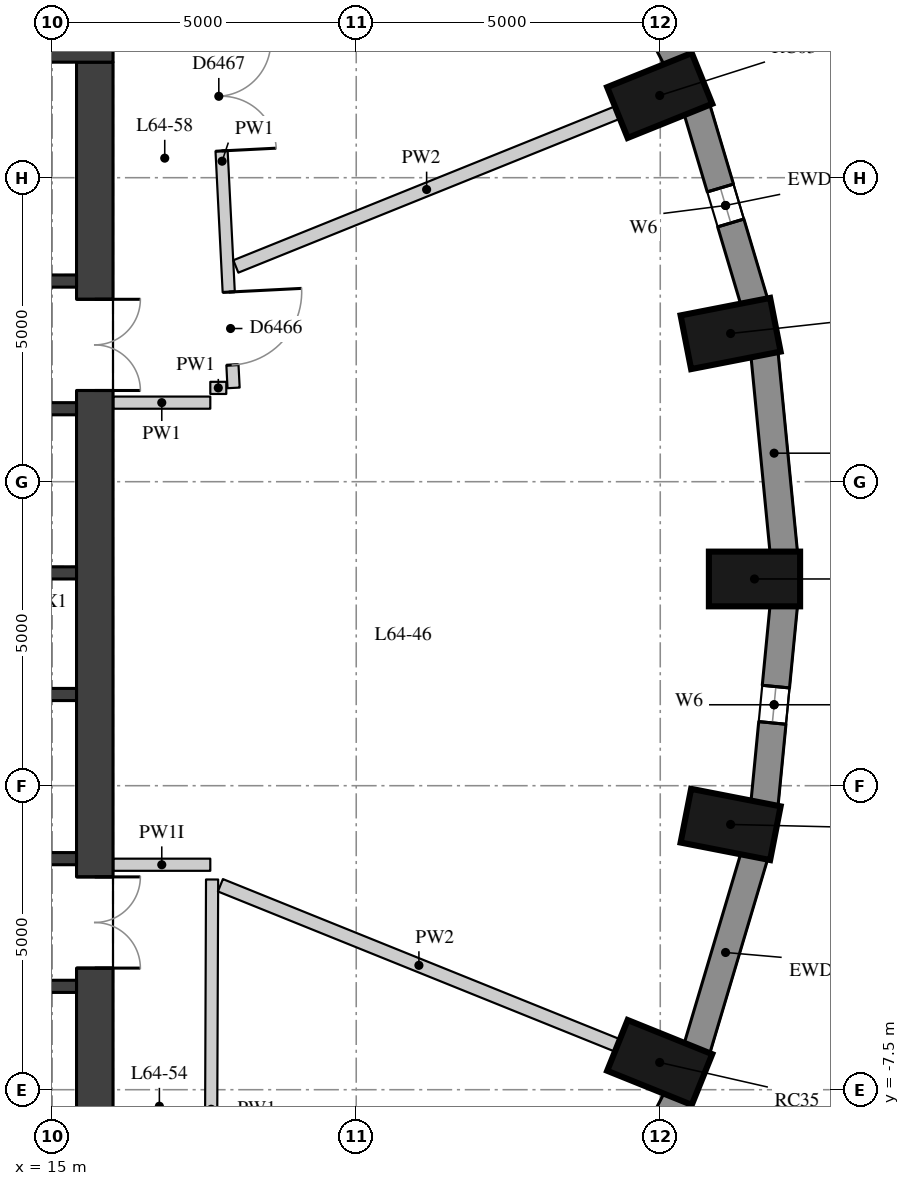
"""IFC4 building model, lengths in metres.
Left out: names, types, materials, properties, quantities, classifications, styles, units other than length and angle.
Written with IfcOpenShell. Run it as: python <this file> out.ifc"""

import sys

from ifc_helpers import new_model, si_unit, direction, frame, frame_2d, origin, origin_2d, place, context, subcontext, project, spatial, rectangle, extrude, element, fill, save


model = new_model("IFC4")
c1 = context("Model", 3, precision=1e-05, world=origin(), true_north=direction((0.0, 1.0)))
c2 = subcontext(c1, "Body", "Model", "MODEL_VIEW")
j1 = project(units=[si_unit("LENGTHUNIT", "METRE"), si_unit("PLANEANGLEUNIT", "RADIAN")], contexts=[c1])
p1 = place(None, origin())
s1 = spatial("IfcSite", under=j1, at=p1, CompositionType="ELEMENT")
p2 = place(p1, origin())
s2 = spatial("IfcBuilding", under=s1, at=p2, CompositionType="ELEMENT")
p3 = place(p2, frame((0.0, 0.0, 225.5)))
s3 = spatial("IfcBuildingStorey", under=s2, at=p3, CompositionType="ELEMENT", Elevation=225.5)
for number, where, z_axis, x_axis in (
    (1, (26.55, 0.9, 0.0), (0.0, 0.0, 1.0), (1.0, 0.0, 0.0)),
    (2, (26.157, 4.937, 0.0), (0.0, 0.0, 1.0), (0.981, 0.192, 0.0)),
    (3, (24.991, 8.852, 0.0), (0.0, 0.0, 1.0), (0.927, 0.374, 0.0)),
    (4, (24.991, -7.052, 0.0), (0.0, 0.0, 1.0), (0.927, -0.374, 0.0)),
    (5, (26.157, -3.137, 0.0), (0.0, 0.0, 1.0), (0.981, -0.192, 0.0)),
):
    element("IfcColumn", number, at=place(p3, frame(where, z_axis=z_axis, x_axis=x_axis)), inside=s3, PredefinedType="COLUMN", context=c2, shape_type="SweptSolid", body=[
        extrude(rectangle(XDim=1.5, YDim=0.9, at=origin_2d()), origin(), (0.0, 0.0, 1.0), 3.3),
    ])
p4 = place(p3, frame((27.032, 1.33, 0.0), z_axis=(0.0, 0.0, 1.0), x_axis=(-0.096824116835, 0.995301507283, 0.0)))
e6 = element("IfcWall", 6, at=p4, inside=s3, PredefinedType="SOLIDWALL", context=c2, shape_type="SweptSolid", body=[
    extrude(rectangle(XDim=3.293, YDim=0.45, at=frame_2d((1.646, 0.0))), origin(), (0.0, 0.0, 1.0), 2.85),
])
p5 = place(p3, frame((26.548, 5.452, 0.0), z_axis=(0.0, 0.0, 1.0), x_axis=(-0.285444972963, 0.958395099847, 0.0)))
e7 = element("IfcWall", 7, at=p5, inside=s3, PredefinedType="SOLIDWALL", context=c2, shape_type="SweptSolid", body=[
    extrude(rectangle(XDim=3.32, YDim=0.45, at=frame_2d((1.66, 0.0))), origin(), (0.0, 0.0, 1.0), 2.85),
])
p6 = place(p5, frame((1.36, 0.0, 0.4)))
e8 = element("IfcOpeningElement", 8, at=p6, cuts=e7, PredefinedType="OPENING", context=c2, shape_type="SweptSolid", body=[
    extrude(rectangle(XDim=0.6, YDim=1.75, at=frame_2d((0.3, 0.875))), frame((0.0, 0.235, 0.0), z_axis=(0.0, -1.0, 0.0), x_axis=(1.0, 0.0, 0.0)), (0.0, 0.0, 1.0), 0.47),
])
p7 = place(p3, frame((25.278, 9.432, 0.0), z_axis=(0.0, 0.0, 1.0), x_axis=(-0.460175500475, 0.887827972505, 0.0)))
e9 = element("IfcWall", 9, at=p7, inside=s3, PredefinedType="SOLIDWALL", context=c2, shape_type="SweptSolid", body=[
    extrude(rectangle(XDim=3.371, YDim=0.45, at=frame_2d((1.685, 0.0))), origin(), (0.0, 0.0, 1.0), 2.85),
])
p8 = place(p3, frame((23.727, -10.624, 0.0), z_axis=(0.0, 0.0, 1.0), x_axis=(0.460175500475, 0.887827972505, 0.0)))
e10 = element("IfcWall", 10, at=p8, inside=s3, PredefinedType="SOLIDWALL", context=c2, shape_type="SweptSolid", body=[
    extrude(rectangle(XDim=3.371, YDim=0.45, at=frame_2d((1.685, 0.0))), origin(), (0.0, 0.0, 1.0), 2.85),
])
p9 = place(p8, frame((1.385, 0.0, 0.4)))
e11 = element("IfcOpeningElement", 11, at=p9, cuts=e10, PredefinedType="OPENING", context=c2, shape_type="SweptSolid", body=[
    extrude(rectangle(XDim=0.6, YDim=1.75, at=frame_2d((0.3, 0.875))), frame((0.0, 0.235, 0.0), z_axis=(0.0, -1.0, 0.0), x_axis=(1.0, 0.0, 0.0)), (0.0, 0.0, 1.0), 0.47),
])
p10 = place(p3, frame((25.6, -6.834, 0.0), z_axis=(0.0, 0.0, 1.0), x_axis=(0.285444972963, 0.958395099847, 0.0)))
e12 = element("IfcWall", 12, at=p10, inside=s3, PredefinedType="SOLIDWALL", context=c2, shape_type="SweptSolid", body=[
    extrude(rectangle(XDim=3.32, YDim=0.45, at=frame_2d((1.66, 0.0))), origin(), (0.0, 0.0, 1.0), 2.85),
])
p11 = place(p3, frame((26.713, -2.808, 0.0), z_axis=(0.0, 0.0, 1.0), x_axis=(0.096816972749, 0.995302202242, 0.0)))
e13 = element("IfcWall", 13, at=p11, inside=s3, PredefinedType="SOLIDWALL", context=c2, shape_type="SweptSolid", body=[
    extrude(rectangle(XDim=3.293, YDim=0.45, at=frame_2d((1.646, 0.0))), origin(), (0.0, 0.0, 1.0), 2.85),
])
p12 = place(p11, frame((1.347, 0.0, 0.4)))
e14 = element("IfcOpeningElement", 14, at=p12, cuts=e13, PredefinedType="OPENING", context=c2, shape_type="SweptSolid", body=[
    extrude(rectangle(XDim=0.6, YDim=1.75, at=frame_2d((0.3, 0.875))), frame((0.0, 0.235, 0.0), z_axis=(0.0, -1.0, 0.0), x_axis=(1.0, 0.0, 0.0)), (0.0, 0.0, 1.0), 0.47),
])
p13 = place(p3, frame((15.7, -9.4, 0.0), z_axis=(0.0, 0.0, 1.0), x_axis=(0.0, 1.0, 0.0)))
e15 = element("IfcWall", 15, at=p13, inside=s3, PredefinedType="SHEAR", context=c2, shape_type="SweptSolid", body=[
    extrude(rectangle(XDim=18.8, YDim=0.6, at=frame_2d((9.4, 0.0))), origin(), (0.0, 0.0, 1.0), 2.85),
])
p14 = place(p13, frame((13.4, 0.0, 0.0)))
e16 = element("IfcOpeningElement", 16, at=p14, cuts=e15, PredefinedType="OPENING", context=c2, shape_type="SweptSolid", body=[
    extrude(rectangle(XDim=1.5, YDim=2.1, at=frame_2d((0.75, 1.05))), frame((0.0, 0.31, 0.0), z_axis=(0.0, -1.0, 0.0), x_axis=(1.0, 0.0, 0.0)), (0.0, 0.0, 1.0), 0.62),
])
p15 = place(p13, frame((3.9, 0.0, 0.0)))
e17 = element("IfcOpeningElement", 17, at=p15, cuts=e15, PredefinedType="OPENING", context=c2, shape_type="SweptSolid", body=[
    extrude(rectangle(XDim=1.5, YDim=2.1, at=frame_2d((0.75, 1.05))), frame((0.0, 0.31, 0.0), z_axis=(0.0, -1.0, 0.0), x_axis=(1.0, 0.0, 0.0)), (0.0, 0.0, 1.0), 0.62),
])
p16 = place(p3, frame((4.0, 9.7, 0.0), z_axis=(0.0, 0.0, 1.0), x_axis=(1.0, 0.0, 0.0)))
e18 = element("IfcWall", 18, at=p16, inside=s3, PredefinedType="SHEAR", context=c2, shape_type="SweptSolid", body=[
    extrude(rectangle(XDim=12.0, YDim=0.6, at=frame_2d((6.0, 0.0))), origin(), (0.0, 0.0, 1.0), 2.85),
])
p17 = place(p3, frame((4.6, 5.8, 0.0), z_axis=(0.0, 0.0, 1.0), x_axis=(1.0, 0.0, 0.0)))
e19 = element("IfcWall", 19, at=p17, inside=s3, PredefinedType="SHEAR", context=c2, shape_type="SweptSolid", body=[
    extrude(rectangle(XDim=10.8, YDim=0.2, at=frame_2d((5.4, 0.0))), origin(), (0.0, 0.0, 1.0), 2.85),
])
p18 = place(p17, frame((7.05, 0.0, 0.0)))
e20 = element("IfcOpeningElement", 20, at=p18, cuts=e19, PredefinedType="OPENING", context=c2, shape_type="SweptSolid", body=[
    extrude(rectangle(XDim=1.1, YDim=2.1, at=frame_2d((0.55, 1.05))), frame((0.0, 0.11, 0.0), z_axis=(0.0, -1.0, 0.0), x_axis=(1.0, 0.0, 0.0)), (0.0, 0.0, 1.0), 0.22),
])
p19 = place(p17, frame((9.05, 0.0, 0.0)))
e21 = element("IfcOpeningElement", 21, at=p19, cuts=e19, PredefinedType="OPENING", context=c2, shape_type="SweptSolid", body=[
    extrude(rectangle(XDim=1.1, YDim=2.1, at=frame_2d((0.55, 1.05))), frame((0.0, 0.11, 0.0), z_axis=(0.0, -1.0, 0.0), x_axis=(1.0, 0.0, 0.0)), (0.0, 0.0, 1.0), 0.22),
])
p20 = place(p3, frame((4.6, 3.7, 0.0), z_axis=(0.0, 0.0, 1.0), x_axis=(1.0, 0.0, 0.0)))
e22 = element("IfcWall", 22, at=p20, inside=s3, PredefinedType="SHEAR", context=c2, shape_type="SweptSolid", body=[
    extrude(rectangle(XDim=10.8, YDim=0.2, at=frame_2d((5.4, 0.0))), origin(), (0.0, 0.0, 1.0), 2.85),
])
p21 = place(p20, frame((6.6, 0.0, 0.0)))
e23 = element("IfcOpeningElement", 23, at=p21, cuts=e22, PredefinedType="OPENING", context=c2, shape_type="SweptSolid", body=[
    extrude(rectangle(XDim=1.1, YDim=2.1, at=frame_2d((0.55, 1.05))), frame((0.0, 0.11, 0.0), z_axis=(0.0, -1.0, 0.0), x_axis=(1.0, 0.0, 0.0)), (0.0, 0.0, 1.0), 0.22),
])
p22 = place(p20, frame((8.9, 0.0, 0.0)))
e24 = element("IfcOpeningElement", 24, at=p22, cuts=e22, PredefinedType="OPENING", context=c2, shape_type="SweptSolid", body=[
    extrude(rectangle(XDim=1.1, YDim=2.1, at=frame_2d((0.55, 1.05))), frame((0.0, 0.11, 0.0), z_axis=(0.0, -1.0, 0.0), x_axis=(1.0, 0.0, 0.0)), (0.0, 0.0, 1.0), 0.22),
])
for number, where, z_axis, x_axis in (
    (25, (4.6, 1.0, 0.0), (0.0, 0.0, 1.0), (1.0, 0.0, 0.0)),
    (26, (4.6, -1.0, 0.0), (0.0, 0.0, 1.0), (1.0, 0.0, 0.0)),
):
    element("IfcWall", number, at=place(p3, frame(where, z_axis=z_axis, x_axis=x_axis)), inside=s3, PredefinedType="SHEAR", context=c2, shape_type="SweptSolid", body=[
        extrude(rectangle(XDim=10.8, YDim=0.2, at=frame_2d((5.4, 0.0))), origin(), (0.0, 0.0, 1.0), 2.85),
    ])
p23 = place(p3, frame((4.6, -3.7, 0.0), z_axis=(0.0, 0.0, 1.0), x_axis=(1.0, 0.0, 0.0)))
e27 = element("IfcWall", 27, at=p23, inside=s3, PredefinedType="SHEAR", context=c2, shape_type="SweptSolid", body=[
    extrude(rectangle(XDim=10.8, YDim=0.2, at=frame_2d((5.4, 0.0))), origin(), (0.0, 0.0, 1.0), 2.85),
])
p24 = place(p23, frame((6.6, 0.0, 0.0)))
e28 = element("IfcOpeningElement", 28, at=p24, cuts=e27, PredefinedType="OPENING", context=c2, shape_type="SweptSolid", body=[
    extrude(rectangle(XDim=1.1, YDim=2.1, at=frame_2d((0.55, 1.05))), frame((0.0, 0.11, 0.0), z_axis=(0.0, -1.0, 0.0), x_axis=(1.0, 0.0, 0.0)), (0.0, 0.0, 1.0), 0.22),
])
p25 = place(p23, frame((8.9, 0.0, 0.0)))
e29 = element("IfcOpeningElement", 29, at=p25, cuts=e27, PredefinedType="OPENING", context=c2, shape_type="SweptSolid", body=[
    extrude(rectangle(XDim=1.1, YDim=2.1, at=frame_2d((0.55, 1.05))), frame((0.0, 0.11, 0.0), z_axis=(0.0, -1.0, 0.0), x_axis=(1.0, 0.0, 0.0)), (0.0, 0.0, 1.0), 0.22),
])
p26 = place(p3, frame((4.6, -5.8, 0.0), z_axis=(0.0, 0.0, 1.0), x_axis=(1.0, 0.0, 0.0)))
e30 = element("IfcWall", 30, at=p26, inside=s3, PredefinedType="SHEAR", context=c2, shape_type="SweptSolid", body=[
    extrude(rectangle(XDim=10.8, YDim=0.2, at=frame_2d((5.4, 0.0))), origin(), (0.0, 0.0, 1.0), 2.85),
])
p27 = place(p3, frame((17.63, -4.043, 0.0), z_axis=(0.0, 0.0, 1.0), x_axis=(-0.003908870153, -0.999992360338, 0.0)))
e31 = element("IfcWall", 31, at=p27, inside=s3, PredefinedType="PARTITIONING", context=c2, shape_type="SweptSolid", body=[
    extrude(rectangle(XDim=7.557, YDim=0.2, at=frame_2d((3.779, 0.0))), origin(), (0.0, 0.0, 1.0), 2.85),
])
p28 = place(p3, frame((17.605, 11.5, 0.0), z_axis=(0.0, 0.0, 1.0), x_axis=(0.050646981223, -0.998716618112, 0.0)))
e32 = element("IfcWall", 32, at=p28, inside=s3, PredefinedType="PARTITIONING", context=c2, shape_type="SweptSolid", body=[
    extrude(rectangle(XDim=7.467, YDim=0.2, at=frame_2d((3.733, 0.0))), origin(), (0.0, 0.0, 1.0), 2.85),
])
p29 = place(p28, frame((5.889, 0.0, 0.0)))
e33 = element("IfcOpeningElement", 33, at=p29, cuts=e32, PredefinedType="OPENING", context=c2, shape_type="SweptSolid", body=[
    extrude(rectangle(XDim=1.2, YDim=2.1, at=frame_2d((0.6, 1.05))), frame((0.0, 0.11, 0.0), z_axis=(0.0, -1.0, 0.0), x_axis=(1.0, 0.0, 0.0)), (0.0, 0.0, 1.0), 0.22),
])
p30 = place(p28, frame((1.765, 0.0, 0.0)))
e34 = element("IfcOpeningElement", 34, at=p30, cuts=e32, PredefinedType="OPENING", context=c2, shape_type="SweptSolid", body=[
    extrude(rectangle(XDim=1.8, YDim=2.1, at=frame_2d((0.9, 1.05))), frame((0.0, 0.11, 0.0), z_axis=(0.0, -1.0, 0.0), x_axis=(1.0, 0.0, 0.0)), (0.0, 0.0, 1.0), 0.22),
])
p31 = place(p3, frame((17.863, 4.043, 0.0), z_axis=(0.0, 0.0, 1.0), x_axis=(-1.0, 0.0, 0.0)))
e35 = element("IfcWall", 35, at=p31, inside=s3, PredefinedType="PARTITIONING", context=c2, shape_type="SweptSolid", body=[
    extrude(rectangle(XDim=0.263, YDim=0.2, at=frame_2d((0.131, 0.0))), origin(), (0.0, 0.0, 1.0), 2.85),
])
p32 = place(p3, frame((17.6, 3.8, 0.0), z_axis=(0.0, 0.0, 1.0), x_axis=(-1.0, 0.0, 0.0)))
e36 = element("IfcWall", 36, at=p32, inside=s3, PredefinedType="PARTITIONING", context=c2, shape_type="SweptSolid", body=[
    extrude(rectangle(XDim=1.596, YDim=0.2, at=frame_2d((0.798, 0.0))), origin(), (0.0, 0.0, 1.0), 2.85),
])
p33 = place(p3, frame((16.004, -3.8, 0.0), z_axis=(0.0, 0.0, 1.0), x_axis=(1.0, 0.0, 0.0)))
e37 = element("IfcWall", 37, at=p33, inside=s3, PredefinedType="PARTITIONING", context=c2, shape_type="SweptSolid", body=[
    extrude(rectangle(XDim=1.596, YDim=0.2, at=frame_2d((0.798, 0.0))), origin(), (0.0, 0.0, 1.0), 2.3),
])
p34 = place(p3, frame((24.295, 8.571, 0.0), z_axis=(0.0, 0.0, 1.0), x_axis=(-0.927397869515, -0.374076451569, 0.0)))
e38 = element("IfcWall", 38, at=p34, inside=s3, PredefinedType="PARTITIONING", context=c2, shape_type="SweptSolid", body=[
    extrude(rectangle(XDim=6.767, YDim=0.22, at=frame_2d((3.383, 0.0))), origin(), (0.0, 0.0, 1.0), 2.85),
])
p35 = place(p3, frame((24.295, -6.771, 0.0), z_axis=(0.0, 0.0, 1.0), x_axis=(-0.927386950843, 0.374103519639, 0.0)))
e39 = element("IfcWall", 39, at=p35, inside=s3, PredefinedType="PARTITIONING", context=c2, shape_type="SweptSolid", body=[
    extrude(rectangle(XDim=7.04, YDim=0.22, at=frame_2d((3.52, 0.0))), origin(), (0.0, 0.0, 1.0), 2.85),
])
p36 = place(p6, origin())
e40 = element("IfcWindow", 40, at=p36, inside=s3, PartitioningType="SINGLE_PANEL", PredefinedType="WINDOW", context=c2, shape_type="SweptSolid", body=[
    extrude(rectangle(XDim=0.6, YDim=1.75, at=frame_2d((0.3, 0.875))), frame((0.0, 0.035, 0.0), z_axis=(0.0, -1.0, 0.0), x_axis=(1.0, 0.0, 0.0)), (0.0, 0.0, 1.0), 0.06),
])
fill(e8, e40)
p37 = place(p12, origin())
e41 = element("IfcWindow", 41, at=p37, inside=s3, PartitioningType="SINGLE_PANEL", PredefinedType="WINDOW", context=c2, shape_type="SweptSolid", body=[
    extrude(rectangle(XDim=0.6, YDim=1.75, at=frame_2d((0.3, 0.875))), frame((0.0, 0.035, 0.0), z_axis=(0.0, -1.0, 0.0), x_axis=(1.0, 0.0, 0.0)), (0.0, 0.0, 1.0), 0.06),
])
fill(e14, e41)
p38 = place(p14, origin())
e42 = element("IfcDoor", 42, at=p38, inside=s3, OperationType="DOUBLE_DOOR_SINGLE_SWING", PredefinedType="DOOR", context=c2, shape_type="SweptSolid", body=[
    extrude(rectangle(XDim=1.5, YDim=2.1, at=frame_2d((0.75, 1.05))), frame((0.0, 0.025, 0.0), z_axis=(0.0, -1.0, 0.0), x_axis=(1.0, 0.0, 0.0)), (0.0, 0.0, 1.0), 0.05),
])
fill(e16, e42)
p39 = place(p15, origin())
e43 = element("IfcDoor", 43, at=p39, inside=s3, OperationType="DOUBLE_DOOR_SINGLE_SWING", PredefinedType="DOOR", context=c2, shape_type="SweptSolid", body=[
    extrude(rectangle(XDim=1.5, YDim=2.1, at=frame_2d((0.75, 1.05))), frame((0.0, 0.025, 0.0), z_axis=(0.0, -1.0, 0.0), x_axis=(1.0, 0.0, 0.0)), (0.0, 0.0, 1.0), 0.05),
])
fill(e17, e43)
p40 = place(p29, origin())
e44 = element("IfcDoor", 44, at=p40, inside=s3, OperationType="SINGLE_SWING_LEFT", PredefinedType="DOOR", context=c2, shape_type="SweptSolid", body=[
    extrude(rectangle(XDim=1.2, YDim=2.1, at=frame_2d((0.6, 1.05))), frame((0.0, 0.025, 0.0), z_axis=(0.0, -1.0, 0.0), x_axis=(1.0, 0.0, 0.0)), (0.0, 0.0, 1.0), 0.05),
])
fill(e33, e44)
p41 = place(p30, origin())
e45 = element("IfcDoor", 45, at=p41, inside=s3, OperationType="DOUBLE_DOOR_SINGLE_SWING", PredefinedType="DOOR", context=c2, shape_type="SweptSolid", body=[
    extrude(rectangle(XDim=1.8, YDim=2.1, at=frame_2d((0.9, 1.05))), frame((0.0, 0.025, 0.0), z_axis=(0.0, -1.0, 0.0), x_axis=(1.0, 0.0, 0.0)), (0.0, 0.0, 1.0), 0.05),
])
fill(e34, e45)
save(model, sys.argv[1])
